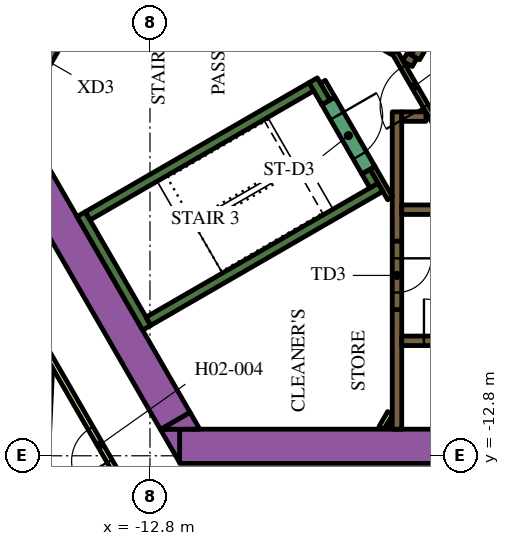
"""IFC4 building model, lengths in metres.
Left out: names, types, materials, properties, quantities, classifications, styles, units other than length and angle.
Written with IfcOpenShell. Run it as: python <this file> out.ifc"""

import sys

from ifc_helpers import new_model, si_unit, direction, frame, frame_2d, origin, place, context, subcontext, project, spatial, polyline, rectangle, outline, extrude, element, fill, save


model = new_model("IFC4")
c1 = context("Model", 3, precision=1e-05, world=origin(), true_north=direction((0.0, 1.0)))
c2 = subcontext(c1, "Body", "Model", "MODEL_VIEW")
j1 = project(units=[si_unit("LENGTHUNIT", "METRE"), si_unit("PLANEANGLEUNIT", "RADIAN")], contexts=[c1])
p1 = place(None, origin())
s1 = spatial("IfcSite", under=j1, at=p1, CompositionType="ELEMENT")
p2 = place(p1, origin())
s2 = spatial("IfcBuilding", under=s1, at=p2, CompositionType="ELEMENT")
p3 = place(p2, frame((0.0, 0.0, 43.2)))
s3 = spatial("IfcBuildingStorey", under=s2, at=p3, CompositionType="ELEMENT", Elevation=43.2)
p4 = place(p3, frame((-12.019, -12.55, 0.0), z_axis=(0.0, 0.0, 1.0), x_axis=(1.0, 0.0, 0.0)))
e1 = element("IfcWall", 1, at=p4, inside=s3, PredefinedType="SOLIDWALL", context=c2, shape_type="SweptSolid", body=[
    extrude(rectangle(XDim=22.083, YDim=0.9, at=frame_2d((11.042, 0.0))), origin(), (0.0, 0.0, 1.0), 3.9),
])
p5 = place(p3, origin())
e2 = element("IfcWall", 2, at=p5, inside=s3, PredefinedType="SOLIDWALL", context=c2, shape_type="SweptSolid", body=[
    extrude(outline(polyline([(-12.529, -12.1), (-12.021, -12.1), (-12.021, -12.98), (-12.529, -12.1)])), origin(), (0.0, 0.0, 1.0), 3.9),
])
p6 = place(p3, frame((-12.134, -11.883, 0.0), z_axis=(0.0, 0.0, 1.0), x_axis=(-0.500005339912, 0.866022320763, 0.0)))
e3 = element("IfcWall", 3, at=p6, inside=s3, PredefinedType="SOLIDWALL", context=c2, shape_type="SweptSolid", body=[
    extrude(rectangle(XDim=9.488, YDim=0.9, at=frame_2d((4.744, 0.0))), origin(), (0.0, 0.0, 1.0), 3.9),
])
e4 = element("IfcWall", 4, at=p5, inside=s3, PredefinedType="SOLIDWALL", context=c2, shape_type="SweptSolid", body=[
    extrude(outline(polyline([(-11.489, -12.1), (-12.505, -12.1), (-11.743, -11.66), (-11.489, -12.1)])), origin(), (0.0, 0.0, 1.0), 3.9),
])
p7 = place(p3, frame((-12.885, -9.431, 0.0), z_axis=(0.0, 0.0, 1.0), x_axis=(-0.500020560727, 0.866013532718, 0.0)))
e5 = element("IfcWall", 5, at=p7, inside=s3, PredefinedType="SOLIDWALL", context=c2, shape_type="SweptSolid", body=[
    extrude(rectangle(XDim=3.45, YDim=0.25, at=frame_2d((1.725, 0.0))), origin(), (0.0, 0.0, 1.0), 3.9),
])
p8 = place(p3, frame((-14.44, -6.49, 0.0), z_axis=(0.0, 0.0, 1.0), x_axis=(0.866022966069, 0.500004222222, 0.0)))
e6 = element("IfcWall", 6, at=p8, inside=s3, PredefinedType="SOLIDWALL", context=c2, shape_type="SweptSolid", body=[
    extrude(rectangle(XDim=6.8, YDim=0.25, at=frame_2d((3.4, 0.0))), origin(), (0.0, 0.0, 1.0), 3.9),
])
p9 = place(p3, frame((-8.168, -3.503, 0.0), z_axis=(0.0, 0.0, 1.0), x_axis=(-0.499952099219, 0.866053057547, 0.0)))
e7 = element("IfcWall", 7, at=p9, inside=s3, PredefinedType="SOLIDWALL", context=c2, shape_type="SweptSolid", body=[
    extrude(rectangle(XDim=0.675, YDim=0.25, at=frame_2d((0.337, 0.0))), origin(), (0.0, 0.0, 1.0), 3.9),
])
p10 = place(p3, frame((-12.84, -9.261, 0.0), z_axis=(0.0, 0.0, 1.0), x_axis=(0.866016039709, 0.500016218704, 0.0)))
e8 = element("IfcWall", 8, at=p10, inside=s3, PredefinedType="SOLIDWALL", context=c2, shape_type="SweptSolid", body=[
    extrude(rectangle(XDim=7.05, YDim=0.25, at=frame_2d((3.525, 0.0))), origin(), (0.0, 0.0, 1.0), 3.9),
])
p11 = place(p3, frame((-6.905, -5.69, 0.0), z_axis=(0.0, 0.0, 1.0), x_axis=(-0.500402024738, 0.865793170242, 0.0)))
e9 = element("IfcWall", 9, at=p11, inside=s3, PredefinedType="SOLIDWALL", context=c2, shape_type="SweptSolid", body=[
    extrude(rectangle(XDim=0.425, YDim=0.25, at=frame_2d((0.212, 0.0))), origin(), (0.0, 0.0, 1.0), 3.9),
])
p12 = place(p3, frame((-6.3, -12.1, 0.0), z_axis=(0.0, 0.0, 1.0), x_axis=(0.0, 1.0, 0.0)))
e10 = element("IfcWall", 10, at=p12, inside=s3, PredefinedType="SOLIDWALL", context=c2, shape_type="SweptSolid", body=[
    extrude(rectangle(XDim=3.146, YDim=0.25, at=frame_2d((1.573, 0.0))), origin(), (0.0, 0.0, 1.0), 3.9),
])
p13 = place(p3, frame((-6.3, -3.75, 0.0), z_axis=(0.0, 0.0, 1.0), x_axis=(0.0, -1.0, 0.0)))
e11 = element("IfcWall", 11, at=p13, inside=s3, PredefinedType="SOLIDWALL", context=c2, shape_type="SweptSolid", body=[
    extrude(rectangle(XDim=3.404, YDim=0.25, at=frame_2d((1.702, 0.0))), origin(), (0.0, 0.0, 1.0), 3.9),
])
p14 = place(p3, frame((-6.175, -3.875, 0.0), z_axis=(0.0, 0.0, 1.0), x_axis=(1.0, 0.0, 0.0)))
e12 = element("IfcWall", 12, at=p14, inside=s3, PredefinedType="SOLIDWALL", context=c2, shape_type="SweptSolid", body=[
    extrude(rectangle(XDim=0.637, YDim=0.25, at=frame_2d((0.318, 0.0))), origin(), (0.0, 0.0, 1.0), 3.9),
])
p15 = place(p3, frame((-6.088, -2.305, 0.0), z_axis=(0.0, 0.0, 1.0), x_axis=(0.866059450854, -0.499941024108, 0.0)))
e13 = element("IfcWall", 13, at=p15, inside=s3, PredefinedType="SOLIDWALL", context=c2, shape_type="SweptSolid", body=[
    extrude(rectangle(XDim=0.29, YDim=0.25, at=frame_2d((0.145, 0.0))), origin(), (0.0, 0.0, 1.0), 3.9),
])
p16 = place(p3, frame((-7.889, -1.265, 0.0), z_axis=(0.0, 0.0, 1.0), x_axis=(0.865986741702, -0.500066958712, 0.0)))
e14 = element("IfcWall", 14, at=p16, inside=s3, PredefinedType="SOLIDWALL", context=c2, shape_type="SweptSolid", body=[
    extrude(rectangle(XDim=1.738, YDim=0.25, at=frame_2d((0.869, 0.0))), origin(), (0.0, 0.0, 1.0), 3.9),
])
p17 = place(p3, frame((-6.708, -12.068, 0.0), z_axis=(0.0, 0.0, 1.0), x_axis=(0.500000789788, 0.8660249478, 0.0)))
e15 = element("IfcWall", 15, at=p17, inside=s3, PredefinedType="PARTITIONING", context=c2, shape_type="SweptSolid", body=[
    extrude(rectangle(XDim=0.456, YDim=0.15, at=frame_2d((0.228, 0.0))), origin(), (0.0, 0.0, 1.0), 2.75),
])
p18 = place(p3, frame((-6.534, -12.068, 0.0), z_axis=(0.0, 0.0, 1.0), x_axis=(0.500240224089, 0.865886665912, 0.0)))
e16 = element("IfcWall", 16, at=p18, inside=s3, PredefinedType="PARTITIONING", context=c2, shape_type="SweptSolid", body=[
    extrude(rectangle(XDim=0.109, YDim=0.15, at=frame_2d((0.054, 0.0))), origin(), (0.0, 0.0, 1.0), 2.75),
])
p19 = place(p3, frame((-6.48, -6.027, 0.0), z_axis=(0.0, 0.0, 1.0), x_axis=(-0.499927229454, 0.866067413802, 0.0)))
e17 = element("IfcWall", 17, at=p19, inside=s3, PredefinedType="PARTITIONING", context=c2, shape_type="SweptSolid", body=[
    extrude(rectangle(XDim=0.929, YDim=0.15, at=frame_2d((0.464, 0.0))), origin(), (0.0, 0.0, 1.0), 3.9),
])
p20 = place(p3, frame((-8.252, -2.958, 0.0), z_axis=(0.0, 0.0, 1.0), x_axis=(0.500174715838, -0.865924508047, 0.0)))
e18 = element("IfcWall", 18, at=p20, inside=s3, PredefinedType="PARTITIONING", context=c2, shape_type="SweptSolid", body=[
    extrude(rectangle(XDim=0.514, YDim=0.15, at=frame_2d((0.257, 0.0))), origin(), (0.0, 0.0, 1.0), 2.75),
])
p21 = place(p3, frame((-6.175, -9.775, 0.0), z_axis=(0.0, 0.0, 1.0), x_axis=(1.0, 0.0, 0.0)))
e19 = element("IfcWall", 19, at=p21, inside=s3, PredefinedType="SOLIDWALL", context=c2, shape_type="SweptSolid", body=[
    extrude(rectangle(XDim=12.35, YDim=0.25, at=frame_2d((6.175, 0.0))), origin(), (0.0, 0.0, 1.0), 3.9),
])
p22 = place(p21, frame((0.585, 0.0, 0.0)))
e20 = element("IfcOpeningElement", 20, at=p22, cuts=e19, PredefinedType="OPENING", context=c2, shape_type="SweptSolid", body=[
    extrude(rectangle(XDim=1.1, YDim=2.1, at=frame_2d((0.55, 1.05))), frame((0.0, 0.135, 0.0), z_axis=(0.0, -1.0, 0.0), x_axis=(1.0, 0.0, 0.0)), (0.0, 0.0, 1.0), 0.27),
])
p23 = place(p21, frame((3.105, 0.0, 0.0)))
e21 = element("IfcOpeningElement", 21, at=p23, cuts=e19, PredefinedType="OPENING", context=c2, shape_type="SweptSolid", body=[
    extrude(rectangle(XDim=1.1, YDim=2.1, at=frame_2d((0.55, 1.05))), frame((0.0, 0.135, 0.0), z_axis=(0.0, -1.0, 0.0), x_axis=(1.0, 0.0, 0.0)), (0.0, 0.0, 1.0), 0.27),
])
p24 = place(p21, frame((5.625, 0.0, 0.0)))
e22 = element("IfcOpeningElement", 22, at=p24, cuts=e19, PredefinedType="OPENING", context=c2, shape_type="SweptSolid", body=[
    extrude(rectangle(XDim=1.1, YDim=2.1, at=frame_2d((0.55, 1.05))), frame((0.0, 0.135, 0.0), z_axis=(0.0, -1.0, 0.0), x_axis=(1.0, 0.0, 0.0)), (0.0, 0.0, 1.0), 0.27),
])
p25 = place(p21, frame((8.145, 0.0, 0.0)))
e23 = element("IfcOpeningElement", 23, at=p25, cuts=e19, PredefinedType="OPENING", context=c2, shape_type="SweptSolid", body=[
    extrude(rectangle(XDim=1.1, YDim=2.1, at=frame_2d((0.55, 1.05))), frame((0.0, 0.135, 0.0), z_axis=(0.0, -1.0, 0.0), x_axis=(1.0, 0.0, 0.0)), (0.0, 0.0, 1.0), 0.27),
])
p26 = place(p21, frame((10.665, 0.0, 0.0)))
e24 = element("IfcOpeningElement", 24, at=p26, cuts=e19, PredefinedType="OPENING", context=c2, shape_type="SweptSolid", body=[
    extrude(rectangle(XDim=1.1, YDim=2.1, at=frame_2d((0.55, 1.05))), frame((0.0, 0.135, 0.0), z_axis=(0.0, -1.0, 0.0), x_axis=(1.0, 0.0, 0.0)), (0.0, 0.0, 1.0), 0.27),
])
p27 = place(p3, frame((-6.175, -6.325, 0.0), z_axis=(0.0, 0.0, 1.0), x_axis=(1.0, 0.0, 0.0)))
e25 = element("IfcWall", 25, at=p27, inside=s3, PredefinedType="SOLIDWALL", context=c2, shape_type="SweptSolid", body=[
    extrude(rectangle(XDim=12.35, YDim=0.25, at=frame_2d((6.175, 0.0))), origin(), (0.0, 0.0, 1.0), 3.9),
])
p28 = place(p27, frame((3.205, 0.0, 0.0)))
e26 = element("IfcOpeningElement", 26, at=p28, cuts=e25, PredefinedType="OPENING", context=c2, shape_type="SweptSolid", body=[
    extrude(rectangle(XDim=0.9, YDim=2.1, at=frame_2d((0.45, 1.05))), frame((0.0, 0.135, 0.0), z_axis=(0.0, -1.0, 0.0), x_axis=(1.0, 0.0, 0.0)), (0.0, 0.0, 1.0), 0.27),
])
p29 = place(p27, frame((8.145, 0.0, 0.0)))
e27 = element("IfcOpeningElement", 27, at=p29, cuts=e25, PredefinedType="OPENING", context=c2, shape_type="SweptSolid", body=[
    extrude(rectangle(XDim=1.1, YDim=2.1, at=frame_2d((0.55, 1.05))), frame((0.0, 0.135, 0.0), z_axis=(0.0, -1.0, 0.0), x_axis=(1.0, 0.0, 0.0)), (0.0, 0.0, 1.0), 0.27),
])
p30 = place(p27, frame((10.665, 0.0, 0.0)))
e28 = element("IfcOpeningElement", 28, at=p30, cuts=e25, PredefinedType="OPENING", context=c2, shape_type="SweptSolid", body=[
    extrude(rectangle(XDim=1.1, YDim=2.1, at=frame_2d((0.55, 1.05))), frame((0.0, 0.135, 0.0), z_axis=(0.0, -1.0, 0.0), x_axis=(1.0, 0.0, 0.0)), (0.0, 0.0, 1.0), 0.27),
])
p31 = place(p3, frame((-0.898, 6.194, 0.0), z_axis=(0.0, 0.0, 1.0), x_axis=(-0.499996202215, -0.866027596426, 0.0)))
e29 = element("IfcWall", 29, at=p31, inside=s3, PredefinedType="SOLIDWALL", context=c2, shape_type="SweptSolid", body=[
    extrude(rectangle(XDim=9.83, YDim=0.25, at=frame_2d((4.915, 0.0))), origin(), (0.0, 0.0, 1.0), 3.9),
])
p32 = place(p31, frame((0.585, 0.0, 0.0)))
e30 = element("IfcOpeningElement", 30, at=p32, cuts=e29, PredefinedType="OPENING", context=c2, shape_type="SweptSolid", body=[
    extrude(rectangle(XDim=1.1, YDim=2.1, at=frame_2d((0.55, 1.05))), frame((0.0, 0.135, 0.0), z_axis=(0.0, -1.0, 0.0), x_axis=(1.0, 0.0, 0.0)), (0.0, 0.0, 1.0), 0.27),
])
p33 = place(p31, frame((3.105, 0.0, 0.0)))
e31 = element("IfcOpeningElement", 31, at=p33, cuts=e29, PredefinedType="OPENING", context=c2, shape_type="SweptSolid", body=[
    extrude(rectangle(XDim=1.1, YDim=2.1, at=frame_2d((0.55, 1.05))), frame((0.0, 0.135, 0.0), z_axis=(0.0, -1.0, 0.0), x_axis=(1.0, 0.0, 0.0)), (0.0, 0.0, 1.0), 0.27),
])
p34 = place(p31, frame((5.625, 0.0, 0.0)))
e32 = element("IfcOpeningElement", 32, at=p34, cuts=e29, PredefinedType="OPENING", context=c2, shape_type="SweptSolid", body=[
    extrude(rectangle(XDim=1.1, YDim=2.1, at=frame_2d((0.55, 1.05))), frame((0.0, 0.135, 0.0), z_axis=(0.0, -1.0, 0.0), x_axis=(1.0, 0.0, 0.0)), (0.0, 0.0, 1.0), 0.27),
])
p35 = place(p31, frame((8.145, 0.0, 0.0)))
e33 = element("IfcOpeningElement", 33, at=p35, cuts=e29, PredefinedType="OPENING", context=c2, shape_type="SweptSolid", body=[
    extrude(rectangle(XDim=1.1, YDim=2.1, at=frame_2d((0.55, 1.05))), frame((0.0, 0.135, 0.0), z_axis=(0.0, -1.0, 0.0), x_axis=(1.0, 0.0, 0.0)), (0.0, 0.0, 1.0), 0.27),
])
p36 = place(p3, frame((-8.103, -3.466, 0.0), z_axis=(0.0, 0.0, 1.0), x_axis=(0.500078061341, -0.865980330357, 0.0)))
e34 = element("IfcWall", 34, at=p36, inside=s3, PredefinedType="SOLIDWALL", context=c2, shape_type="SweptSolid", body=[
    extrude(rectangle(XDim=2.1, YDim=0.4, at=frame_2d((1.05, 0.0))), origin(), (0.0, 0.0, 1.0), 3.9),
])
p37 = place(p36, frame((0.45, 0.0, 0.0)))
e35 = element("IfcOpeningElement", 35, at=p37, cuts=e34, PredefinedType="OPENING", context=c2, shape_type="SweptSolid", body=[
    extrude(rectangle(XDim=1.2, YDim=2.1, at=frame_2d((0.6, 1.05))), frame((0.0, 0.21, 0.0), z_axis=(0.0, -1.0, 0.0), x_axis=(1.0, 0.0, 0.0)), (0.0, 0.0, 1.0), 0.42),
])
p38 = place(p3, frame((-6.3, -7.154, 0.0), z_axis=(0.0, 0.0, 1.0), x_axis=(0.0, -1.0, 0.0)))
e36 = element("IfcWall", 36, at=p38, inside=s3, PredefinedType="SOLIDWALL", context=c2, shape_type="SweptSolid", body=[
    extrude(rectangle(XDim=1.8, YDim=0.25, at=frame_2d((0.9, 0.0))), origin(), (0.0, 0.0, 1.0), 3.9),
])
p39 = place(p38, frame((0.45, 0.0, 0.0)))
e37 = element("IfcOpeningElement", 37, at=p39, cuts=e36, PredefinedType="OPENING", context=c2, shape_type="SweptSolid", body=[
    extrude(rectangle(XDim=0.9, YDim=2.1, at=frame_2d((0.45, 1.05))), frame((0.0, 0.135, 0.0), z_axis=(0.0, -1.0, 0.0), x_axis=(1.0, 0.0, 0.0)), (0.0, 0.0, 1.0), 0.27),
])
p40 = place(p3, frame((-5.317, -3.99, 0.0), z_axis=(0.0, 0.0, 1.0), x_axis=(-0.500027713859, 0.866009402589, 0.0)))
e38 = element("IfcWall", 38, at=p40, inside=s3, PredefinedType="PARTITIONING", context=c2, shape_type="SweptSolid", body=[
    extrude(rectangle(XDim=2.1, YDim=0.15, at=frame_2d((1.05, 0.0))), origin(), (0.0, 0.0, 1.0), 3.9),
])
p41 = place(p40, frame((0.45, 0.0, 0.0)))
e39 = element("IfcOpeningElement", 39, at=p41, cuts=e38, PredefinedType="OPENING", context=c2, shape_type="SweptSolid", body=[
    extrude(rectangle(XDim=1.2, YDim=2.1, at=frame_2d((0.6, 1.05))), frame((0.0, 0.085, 0.0), z_axis=(0.0, -1.0, 0.0), x_axis=(1.0, 0.0, 0.0)), (0.0, 0.0, 1.0), 0.17),
])
p42 = place(p3, frame((-16.209, -2.976, 0.0), z_axis=(0.0, 0.0, 1.0), x_axis=(0.499954529098, 0.86605165483, 0.0)))
e40 = element("IfcWall", 40, at=p42, inside=s3, PredefinedType="SOLIDWALL", context=c2, shape_type="SweptSolid", body=[
    extrude(rectangle(XDim=1.7, YDim=0.9, at=frame_2d((0.85, 0.0))), origin(), (0.0, 0.0, 1.0), 3.9),
])
p43 = place(p42, frame((0.25, 0.0, 0.0)))
e41 = element("IfcOpeningElement", 41, at=p43, cuts=e40, PredefinedType="OPENING", context=c2, shape_type="SweptSolid", body=[
    extrude(rectangle(XDim=1.2, YDim=2.1, at=frame_2d((0.6, 1.05))), frame((0.0, 0.46, 0.0), z_axis=(0.0, -1.0, 0.0), x_axis=(1.0, 0.0, 0.0)), (0.0, 0.0, 1.0), 0.92),
])
p44 = place(p3, frame((-19.081, -3.9, 0.0), z_axis=(0.0, 0.0, 1.0), x_axis=(0.499998313975, 0.866026377209, 0.0)))
e42 = element("IfcWall", 42, at=p44, inside=s3, PredefinedType="PARTITIONING", context=c2, shape_type="SweptSolid", body=[
    extrude(rectangle(XDim=25.766, YDim=0.15, at=frame_2d((12.883, 0.0))), origin(), (0.0, 0.0, 1.0), 2.75),
])
p45 = place(p44, frame((16.196, 0.0, 0.0)))
e43 = element("IfcOpeningElement", 43, at=p45, cuts=e42, PredefinedType="OPENING", context=c2, shape_type="SweptSolid", body=[
    extrude(rectangle(XDim=1.0, YDim=2.1, at=frame_2d((0.5, 1.05))), frame((0.0, 0.085, 0.0), z_axis=(0.0, -1.0, 0.0), x_axis=(1.0, 0.0, 0.0)), (0.0, 0.0, 1.0), 0.17),
])
p46 = place(p44, frame((14.889, 0.0, 0.0)))
e44 = element("IfcOpeningElement", 44, at=p46, cuts=e42, PredefinedType="OPENING", context=c2, shape_type="SweptSolid", body=[
    extrude(rectangle(XDim=1.0, YDim=2.1, at=frame_2d((0.5, 1.05))), frame((0.0, 0.085, 0.0), z_axis=(0.0, -1.0, 0.0), x_axis=(1.0, 0.0, 0.0)), (0.0, 0.0, 1.0), 0.17),
])
p47 = place(p44, frame((3.698, 0.0, 0.0)))
e45 = element("IfcOpeningElement", 45, at=p47, cuts=e42, PredefinedType="OPENING", context=c2, shape_type="SweptSolid", body=[
    extrude(rectangle(XDim=1.1, YDim=2.1, at=frame_2d((0.55, 1.05))), frame((0.0, 0.085, 0.0), z_axis=(0.0, -1.0, 0.0), x_axis=(1.0, 0.0, 0.0)), (0.0, 0.0, 1.0), 0.17),
])
p48 = place(p44, frame((2.392, 0.0, 0.0)))
e46 = element("IfcOpeningElement", 46, at=p48, cuts=e42, PredefinedType="OPENING", context=c2, shape_type="SweptSolid", body=[
    extrude(rectangle(XDim=1.0, YDim=2.1, at=frame_2d((0.5, 1.05))), frame((0.0, 0.085, 0.0), z_axis=(0.0, -1.0, 0.0), x_axis=(1.0, 0.0, 0.0)), (0.0, 0.0, 1.0), 0.17),
])
p49 = place(p3, frame((-12.918, -14.575, 0.0), z_axis=(0.0, 0.0, 1.0), x_axis=(-0.500009150678, 0.866020120573, 0.0)))
e47 = element("IfcWall", 47, at=p49, inside=s3, PredefinedType="PARTITIONING", context=c2, shape_type="SweptSolid", body=[
    extrude(rectangle(XDim=5.258, YDim=0.15, at=frame_2d((2.629, 0.0))), origin(), (0.0, 0.0, 1.0), 2.75),
])
p50 = place(p49, frame((1.888, 0.0, 0.0)))
e48 = element("IfcOpeningElement", 48, at=p50, cuts=e47, PredefinedType="OPENING", context=c2, shape_type="SweptSolid", body=[
    extrude(rectangle(XDim=1.0, YDim=2.1, at=frame_2d((0.5, 1.05))), frame((0.0, 0.085, 0.0), z_axis=(0.0, -1.0, 0.0), x_axis=(1.0, 0.0, 0.0)), (0.0, 0.0, 1.0), 0.17),
])
p51 = place(p3, frame((-15.973, -22.109, 0.0), z_axis=(0.0, 0.0, 1.0), x_axis=(0.046191717129, 0.998932592955, 0.0)))
e49 = element("IfcWall", 49, at=p51, inside=s3, PredefinedType="PARTITIONING", context=c2, shape_type="SweptSolid", body=[
    extrude(rectangle(XDim=11.638, YDim=0.15, at=frame_2d((5.819, 0.0))), origin(), (0.0, 0.0, 1.0), 2.75),
])
p52 = place(p22, origin())
e50 = element("IfcDoor", 50, at=p52, inside=s3, OperationType="DOUBLE_DOOR_SLIDING", PredefinedType="DOOR", context=c2, shape_type="SweptSolid", body=[
    extrude(rectangle(XDim=1.1, YDim=2.1, at=frame_2d((0.55, 1.05))), frame((0.0, 0.025, 0.0), z_axis=(0.0, -1.0, 0.0), x_axis=(1.0, 0.0, 0.0)), (0.0, 0.0, 1.0), 0.05),
])
fill(e20, e50)
p53 = place(p37, origin())
e51 = element("IfcDoor", 51, at=p53, inside=s3, OperationType="SINGLE_SWING_LEFT", PredefinedType="DOOR", context=c2, shape_type="SweptSolid", body=[
    extrude(rectangle(XDim=1.2, YDim=2.1, at=frame_2d((0.6, 1.05))), frame((0.0, 0.025, 0.0), z_axis=(0.0, -1.0, 0.0), x_axis=(1.0, 0.0, 0.0)), (0.0, 0.0, 1.0), 0.05),
])
fill(e35, e51)
p54 = place(p39, origin())
e52 = element("IfcDoor", 52, at=p54, inside=s3, OperationType="SINGLE_SWING_LEFT", PredefinedType="DOOR", context=c2, shape_type="SweptSolid", body=[
    extrude(rectangle(XDim=0.9, YDim=2.1, at=frame_2d((0.45, 1.05))), frame((0.0, 0.025, 0.0), z_axis=(0.0, -1.0, 0.0), x_axis=(1.0, 0.0, 0.0)), (0.0, 0.0, 1.0), 0.05),
])
fill(e37, e52)
p55 = place(p41, origin())
e53 = element("IfcDoor", 53, at=p55, inside=s3, OperationType="SINGLE_SWING_LEFT", PredefinedType="DOOR", context=c2, shape_type="SweptSolid", body=[
    extrude(rectangle(XDim=1.2, YDim=2.1, at=frame_2d((0.6, 1.05))), frame((0.0, 0.025, 0.0), z_axis=(0.0, -1.0, 0.0), x_axis=(1.0, 0.0, 0.0)), (0.0, 0.0, 1.0), 0.05),
])
fill(e39, e53)
p56 = place(p50, origin())
e54 = element("IfcDoor", 54, at=p56, inside=s3, OperationType="SINGLE_SWING_LEFT", PredefinedType="DOOR", context=c2, shape_type="SweptSolid", body=[
    extrude(rectangle(XDim=1.0, YDim=2.1, at=frame_2d((0.5, 1.05))), frame((0.0, 0.025, 0.0), z_axis=(0.0, -1.0, 0.0), x_axis=(1.0, 0.0, 0.0)), (0.0, 0.0, 1.0), 0.05),
])
fill(e48, e54)
save(model, sys.argv[1])
